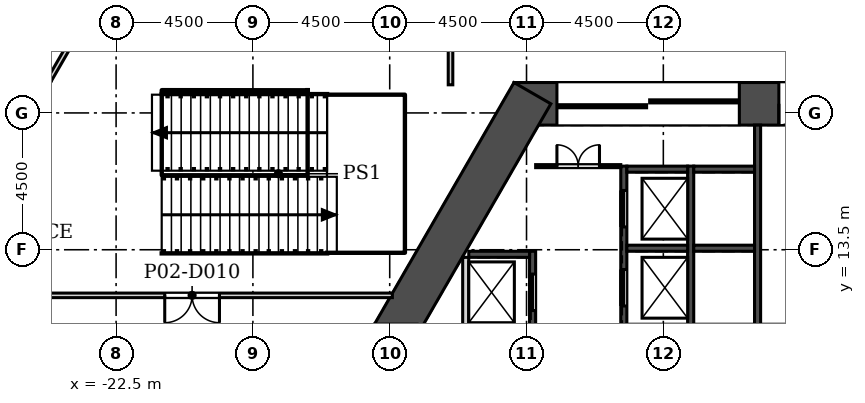
"""IFC4 building model, lengths in metres.
Left out: names, types, materials, properties, quantities, classifications, styles, units other than length and angle.
Written with IfcOpenShell. Run it as: python <this file> out.ifc"""

import sys

from ifc_helpers import new_model, si_unit, direction, frame, frame_2d, origin, place, context, subcontext, project, spatial, rectangle, extrude, element, fill, save


model = new_model("IFC4")
c1 = context("Model", 3, precision=1e-05, world=origin(), true_north=direction((0.0, 1.0)))
c2 = subcontext(c1, "Body", "Model", "MODEL_VIEW")
j1 = project(units=[si_unit("LENGTHUNIT", "METRE"), si_unit("PLANEANGLEUNIT", "RADIAN")], contexts=[c1])
p1 = place(None, origin())
s1 = spatial("IfcSite", under=j1, at=p1, CompositionType="ELEMENT")
p2 = place(p1, origin())
s2 = spatial("IfcBuilding", under=s1, at=p2, CompositionType="ELEMENT")
p3 = place(p2, frame((0.0, 0.0, 14.0)))
s3 = spatial("IfcBuildingStorey", under=s2, at=p3, CompositionType="ELEMENT", Elevation=14.0)
p4 = place(p3, frame((9.412, 18.3, 0.0), z_axis=(0.0, 0.0, 1.0), x_axis=(-1.0, 0.0, 0.0)))
e1 = element("IfcWall", 1, at=p4, inside=s3, PredefinedType="SHEAR", context=c2, shape_type="SweptSolid", body=[
    extrude(rectangle(XDim=18.823, YDim=1.4, at=frame_2d((9.412, 0.0))), origin(), (0.0, 0.0, 1.0), 6.0),
])
p5 = place(p4, frame((8.711, 0.0, 0.0)))
e2 = element("IfcOpeningElement", 2, at=p5, cuts=e1, PredefinedType="OPENING", context=c2, shape_type="SweptSolid", body=[
    extrude(rectangle(XDim=1.4, YDim=2.1, at=frame_2d((0.7, 1.05))), frame((0.0, 0.71, 0.0), z_axis=(0.0, -1.0, 0.0), x_axis=(1.0, 0.0, 0.0)), (0.0, 0.0, 1.0), 1.42),
])
p6 = place(p4, frame((11.412, 0.0, 0.0)))
e3 = element("IfcOpeningElement", 3, at=p6, cuts=e1, PredefinedType="OPENING", context=c2, shape_type="SweptSolid", body=[
    extrude(rectangle(XDim=6.0, YDim=2.4, at=frame_2d((3.0, 1.2))), frame((0.0, 0.71, 0.0), z_axis=(0.0, -1.0, 0.0), x_axis=(1.0, 0.0, 0.0)), (0.0, 0.0, 1.0), 1.42),
])
p7 = place(p4, frame((1.412, 0.0, 0.0)))
e4 = element("IfcOpeningElement", 4, at=p7, cuts=e1, PredefinedType="OPENING", context=c2, shape_type="SweptSolid", body=[
    extrude(rectangle(XDim=6.0, YDim=2.4, at=frame_2d((3.0, 1.2))), frame((0.0, 0.71, 0.0), z_axis=(0.0, -1.0, 0.0), x_axis=(1.0, 0.0, 0.0)), (0.0, 0.0, 1.0), 1.42),
])
p8 = place(p3, frame((-8.805, 18.65, 0.0), z_axis=(0.0, 0.0, 1.0), x_axis=(-0.50000187635, -0.866024320471, 0.0)))
e5 = element("IfcWall", 5, at=p8, inside=s3, PredefinedType="SHEAR", context=c2, shape_type="SweptSolid", body=[
    extrude(rectangle(XDim=9.177, YDim=1.4, at=frame_2d((4.588, 0.0))), origin(), (0.0, 0.0, 1.0), 6.0),
])
p9 = place(p3, frame((-4.853, 74.393, 0.0), z_axis=(0.0, 0.0, 1.0), x_axis=(-0.49999894854, -0.866026010844, 0.0)))
e6 = element("IfcWall", 6, at=p9, inside=s3, PredefinedType="SOLIDWALL", context=c2, shape_type="SweptSolid", body=[
    extrude(rectangle(XDim=76.0, YDim=0.34, at=frame_2d((38.0, 0.0))), origin(), (0.0, 0.0, 1.0), 5.7),
])
p10 = place(p9, frame((1.058, 0.0, 0.9)))
e7 = element("IfcOpeningElement", 7, at=p10, cuts=e6, PredefinedType="OPENING", context=c2, shape_type="SweptSolid", body=[
    extrude(rectangle(XDim=1.885, YDim=3.5, at=frame_2d((0.942, 1.75))), frame((0.0, 0.18, 0.0), z_axis=(0.0, -1.0, 0.0), x_axis=(1.0, 0.0, 0.0)), (0.0, 0.0, 1.0), 0.36),
])
p11 = place(p9, frame((4.058, 0.0, 0.9)))
e8 = element("IfcOpeningElement", 8, at=p11, cuts=e6, PredefinedType="OPENING", context=c2, shape_type="SweptSolid", body=[
    extrude(rectangle(XDim=1.885, YDim=3.5, at=frame_2d((0.942, 1.75))), frame((0.0, 0.18, 0.0), z_axis=(0.0, -1.0, 0.0), x_axis=(1.0, 0.0, 0.0)), (0.0, 0.0, 1.0), 0.36),
])
p12 = place(p9, frame((7.058, 0.0, 0.9)))
e9 = element("IfcOpeningElement", 9, at=p12, cuts=e6, PredefinedType="OPENING", context=c2, shape_type="SweptSolid", body=[
    extrude(rectangle(XDim=1.885, YDim=3.5, at=frame_2d((0.942, 1.75))), frame((0.0, 0.18, 0.0), z_axis=(0.0, -1.0, 0.0), x_axis=(1.0, 0.0, 0.0)), (0.0, 0.0, 1.0), 0.36),
])
p13 = place(p9, frame((10.058, 0.0, 0.9)))
e10 = element("IfcOpeningElement", 10, at=p13, cuts=e6, PredefinedType="OPENING", context=c2, shape_type="SweptSolid", body=[
    extrude(rectangle(XDim=1.885, YDim=3.5, at=frame_2d((0.942, 1.75))), frame((0.0, 0.18, 0.0), z_axis=(0.0, -1.0, 0.0), x_axis=(1.0, 0.0, 0.0)), (0.0, 0.0, 1.0), 0.36),
])
p14 = place(p9, frame((13.058, 0.0, 0.9)))
e11 = element("IfcOpeningElement", 11, at=p14, cuts=e6, PredefinedType="OPENING", context=c2, shape_type="SweptSolid", body=[
    extrude(rectangle(XDim=1.885, YDim=3.5, at=frame_2d((0.942, 1.75))), frame((0.0, 0.18, 0.0), z_axis=(0.0, -1.0, 0.0), x_axis=(1.0, 0.0, 0.0)), (0.0, 0.0, 1.0), 0.36),
])
p15 = place(p9, frame((16.058, 0.0, 0.9)))
e12 = element("IfcOpeningElement", 12, at=p15, cuts=e6, PredefinedType="OPENING", context=c2, shape_type="SweptSolid", body=[
    extrude(rectangle(XDim=1.885, YDim=3.5, at=frame_2d((0.942, 1.75))), frame((0.0, 0.18, 0.0), z_axis=(0.0, -1.0, 0.0), x_axis=(1.0, 0.0, 0.0)), (0.0, 0.0, 1.0), 0.36),
])
p16 = place(p9, frame((19.058, 0.0, 0.9)))
e13 = element("IfcOpeningElement", 13, at=p16, cuts=e6, PredefinedType="OPENING", context=c2, shape_type="SweptSolid", body=[
    extrude(rectangle(XDim=1.885, YDim=3.5, at=frame_2d((0.942, 1.75))), frame((0.0, 0.18, 0.0), z_axis=(0.0, -1.0, 0.0), x_axis=(1.0, 0.0, 0.0)), (0.0, 0.0, 1.0), 0.36),
])
p17 = place(p9, frame((22.058, 0.0, 0.9)))
e14 = element("IfcOpeningElement", 14, at=p17, cuts=e6, PredefinedType="OPENING", context=c2, shape_type="SweptSolid", body=[
    extrude(rectangle(XDim=1.885, YDim=3.5, at=frame_2d((0.942, 1.75))), frame((0.0, 0.18, 0.0), z_axis=(0.0, -1.0, 0.0), x_axis=(1.0, 0.0, 0.0)), (0.0, 0.0, 1.0), 0.36),
])
p18 = place(p9, frame((25.058, 0.0, 0.9)))
e15 = element("IfcOpeningElement", 15, at=p18, cuts=e6, PredefinedType="OPENING", context=c2, shape_type="SweptSolid", body=[
    extrude(rectangle(XDim=1.885, YDim=3.5, at=frame_2d((0.942, 1.75))), frame((0.0, 0.18, 0.0), z_axis=(0.0, -1.0, 0.0), x_axis=(1.0, 0.0, 0.0)), (0.0, 0.0, 1.0), 0.36),
])
p19 = place(p9, frame((28.058, 0.0, 0.9)))
e16 = element("IfcOpeningElement", 16, at=p19, cuts=e6, PredefinedType="OPENING", context=c2, shape_type="SweptSolid", body=[
    extrude(rectangle(XDim=1.885, YDim=3.5, at=frame_2d((0.942, 1.75))), frame((0.0, 0.18, 0.0), z_axis=(0.0, -1.0, 0.0), x_axis=(1.0, 0.0, 0.0)), (0.0, 0.0, 1.0), 0.36),
])
p20 = place(p9, frame((31.058, 0.0, 0.9)))
e17 = element("IfcOpeningElement", 17, at=p20, cuts=e6, PredefinedType="OPENING", context=c2, shape_type="SweptSolid", body=[
    extrude(rectangle(XDim=1.885, YDim=3.5, at=frame_2d((0.942, 1.75))), frame((0.0, 0.18, 0.0), z_axis=(0.0, -1.0, 0.0), x_axis=(1.0, 0.0, 0.0)), (0.0, 0.0, 1.0), 0.36),
])
p21 = place(p9, frame((34.058, 0.0, 0.9)))
e18 = element("IfcOpeningElement", 18, at=p21, cuts=e6, PredefinedType="OPENING", context=c2, shape_type="SweptSolid", body=[
    extrude(rectangle(XDim=1.885, YDim=3.5, at=frame_2d((0.942, 1.75))), frame((0.0, 0.18, 0.0), z_axis=(0.0, -1.0, 0.0), x_axis=(1.0, 0.0, 0.0)), (0.0, 0.0, 1.0), 0.36),
])
p22 = place(p9, frame((37.058, 0.0, 0.9)))
e19 = element("IfcOpeningElement", 19, at=p22, cuts=e6, PredefinedType="OPENING", context=c2, shape_type="SweptSolid", body=[
    extrude(rectangle(XDim=1.885, YDim=3.5, at=frame_2d((0.942, 1.75))), frame((0.0, 0.18, 0.0), z_axis=(0.0, -1.0, 0.0), x_axis=(1.0, 0.0, 0.0)), (0.0, 0.0, 1.0), 0.36),
])
p23 = place(p9, frame((40.058, 0.0, 0.9)))
e20 = element("IfcOpeningElement", 20, at=p23, cuts=e6, PredefinedType="OPENING", context=c2, shape_type="SweptSolid", body=[
    extrude(rectangle(XDim=1.885, YDim=3.5, at=frame_2d((0.942, 1.75))), frame((0.0, 0.18, 0.0), z_axis=(0.0, -1.0, 0.0), x_axis=(1.0, 0.0, 0.0)), (0.0, 0.0, 1.0), 0.36),
])
p24 = place(p9, frame((43.058, 0.0, 0.9)))
e21 = element("IfcOpeningElement", 21, at=p24, cuts=e6, PredefinedType="OPENING", context=c2, shape_type="SweptSolid", body=[
    extrude(rectangle(XDim=1.885, YDim=3.5, at=frame_2d((0.942, 1.75))), frame((0.0, 0.18, 0.0), z_axis=(0.0, -1.0, 0.0), x_axis=(1.0, 0.0, 0.0)), (0.0, 0.0, 1.0), 0.36),
])
p25 = place(p9, frame((46.058, 0.0, 0.9)))
e22 = element("IfcOpeningElement", 22, at=p25, cuts=e6, PredefinedType="OPENING", context=c2, shape_type="SweptSolid", body=[
    extrude(rectangle(XDim=1.885, YDim=3.5, at=frame_2d((0.942, 1.75))), frame((0.0, 0.18, 0.0), z_axis=(0.0, -1.0, 0.0), x_axis=(1.0, 0.0, 0.0)), (0.0, 0.0, 1.0), 0.36),
])
p26 = place(p9, frame((49.058, 0.0, 0.9)))
e23 = element("IfcOpeningElement", 23, at=p26, cuts=e6, PredefinedType="OPENING", context=c2, shape_type="SweptSolid", body=[
    extrude(rectangle(XDim=1.885, YDim=3.5, at=frame_2d((0.942, 1.75))), frame((0.0, 0.18, 0.0), z_axis=(0.0, -1.0, 0.0), x_axis=(1.0, 0.0, 0.0)), (0.0, 0.0, 1.0), 0.36),
])
p27 = place(p9, frame((52.058, 0.0, 0.9)))
e24 = element("IfcOpeningElement", 24, at=p27, cuts=e6, PredefinedType="OPENING", context=c2, shape_type="SweptSolid", body=[
    extrude(rectangle(XDim=1.885, YDim=3.5, at=frame_2d((0.942, 1.75))), frame((0.0, 0.18, 0.0), z_axis=(0.0, -1.0, 0.0), x_axis=(1.0, 0.0, 0.0)), (0.0, 0.0, 1.0), 0.36),
])
p28 = place(p9, frame((55.058, 0.0, 0.9)))
e25 = element("IfcOpeningElement", 25, at=p28, cuts=e6, PredefinedType="OPENING", context=c2, shape_type="SweptSolid", body=[
    extrude(rectangle(XDim=1.885, YDim=3.5, at=frame_2d((0.942, 1.75))), frame((0.0, 0.18, 0.0), z_axis=(0.0, -1.0, 0.0), x_axis=(1.0, 0.0, 0.0)), (0.0, 0.0, 1.0), 0.36),
])
p29 = place(p9, frame((58.058, 0.0, 0.9)))
e26 = element("IfcOpeningElement", 26, at=p29, cuts=e6, PredefinedType="OPENING", context=c2, shape_type="SweptSolid", body=[
    extrude(rectangle(XDim=1.885, YDim=3.5, at=frame_2d((0.942, 1.75))), frame((0.0, 0.18, 0.0), z_axis=(0.0, -1.0, 0.0), x_axis=(1.0, 0.0, 0.0)), (0.0, 0.0, 1.0), 0.36),
])
p30 = place(p9, frame((61.058, 0.0, 0.9)))
e27 = element("IfcOpeningElement", 27, at=p30, cuts=e6, PredefinedType="OPENING", context=c2, shape_type="SweptSolid", body=[
    extrude(rectangle(XDim=1.885, YDim=3.5, at=frame_2d((0.942, 1.75))), frame((0.0, 0.18, 0.0), z_axis=(0.0, -1.0, 0.0), x_axis=(1.0, 0.0, 0.0)), (0.0, 0.0, 1.0), 0.36),
])
p31 = place(p9, frame((64.058, 0.0, 0.9)))
e28 = element("IfcOpeningElement", 28, at=p31, cuts=e6, PredefinedType="OPENING", context=c2, shape_type="SweptSolid", body=[
    extrude(rectangle(XDim=1.885, YDim=3.5, at=frame_2d((0.942, 1.75))), frame((0.0, 0.18, 0.0), z_axis=(0.0, -1.0, 0.0), x_axis=(1.0, 0.0, 0.0)), (0.0, 0.0, 1.0), 0.36),
])
p32 = place(p9, frame((67.058, 0.0, 0.9)))
e29 = element("IfcOpeningElement", 29, at=p32, cuts=e6, PredefinedType="OPENING", context=c2, shape_type="SweptSolid", body=[
    extrude(rectangle(XDim=1.885, YDim=3.5, at=frame_2d((0.942, 1.75))), frame((0.0, 0.18, 0.0), z_axis=(0.0, -1.0, 0.0), x_axis=(1.0, 0.0, 0.0)), (0.0, 0.0, 1.0), 0.36),
])
p33 = place(p9, frame((70.058, 0.0, 0.9)))
e30 = element("IfcOpeningElement", 30, at=p33, cuts=e6, PredefinedType="OPENING", context=c2, shape_type="SweptSolid", body=[
    extrude(rectangle(XDim=1.885, YDim=3.5, at=frame_2d((0.942, 1.75))), frame((0.0, 0.18, 0.0), z_axis=(0.0, -1.0, 0.0), x_axis=(1.0, 0.0, 0.0)), (0.0, 0.0, 1.0), 0.36),
])
p34 = place(p9, frame((73.058, 0.0, 0.9)))
e31 = element("IfcOpeningElement", 31, at=p34, cuts=e6, PredefinedType="OPENING", context=c2, shape_type="SweptSolid", body=[
    extrude(rectangle(XDim=1.885, YDim=3.5, at=frame_2d((0.942, 1.75))), frame((0.0, 0.18, 0.0), z_axis=(0.0, -1.0, 0.0), x_axis=(1.0, 0.0, 0.0)), (0.0, 0.0, 1.0), 0.36),
])
p35 = place(p3, frame((-11.0, 5.85, 0.0), z_axis=(0.0, 0.0, 1.0), x_axis=(0.0, 1.0, 0.0)))
e32 = element("IfcWall", 32, at=p35, inside=s3, PredefinedType="SOLIDWALL", context=c2, shape_type="SweptSolid", body=[
    extrude(rectangle(XDim=7.4, YDim=0.2, at=frame_2d((3.7, 0.0))), origin(), (0.0, 0.0, 1.0), 5.7),
])
p36 = place(p3, frame((-8.8, 8.25, -0.3), z_axis=(0.0, 0.0, 1.0), x_axis=(0.0, 1.0, 0.0)))
e33 = element("IfcWall", 33, at=p36, inside=s3, PredefinedType="SOLIDWALL", context=c2, shape_type="SweptSolid", body=[
    extrude(rectangle(XDim=5.2, YDim=0.2, at=frame_2d((2.6, 0.0))), origin(), (0.0, 0.0, 1.0), 6.0),
])
p37 = place(p36, frame((0.75, 0.0, 0.3)))
e34 = element("IfcOpeningElement", 34, at=p37, cuts=e33, PredefinedType="OPENING", context=c2, shape_type="SweptSolid", body=[
    extrude(rectangle(XDim=1.2, YDim=2.1, at=frame_2d((0.6, 1.05))), frame((0.0, 0.11, 0.0), z_axis=(0.0, -1.0, 0.0), x_axis=(1.0, 0.0, 0.0)), (0.0, 0.0, 1.0), 0.22),
])
p38 = place(p36, frame((3.25, 0.0, 0.3)))
e35 = element("IfcOpeningElement", 35, at=p38, cuts=e33, PredefinedType="OPENING", context=c2, shape_type="SweptSolid", body=[
    extrude(rectangle(XDim=1.2, YDim=2.1, at=frame_2d((0.6, 1.05))), frame((0.0, 0.11, 0.0), z_axis=(0.0, -1.0, 0.0), x_axis=(1.0, 0.0, 0.0)), (0.0, 0.0, 1.0), 0.22),
])
p39 = place(p3, frame((-5.8, 8.25, -0.3), z_axis=(0.0, 0.0, 1.0), x_axis=(0.0, 1.0, 0.0)))
e36 = element("IfcWall", 36, at=p39, inside=s3, PredefinedType="SOLIDWALL", context=c2, shape_type="SweptSolid", body=[
    extrude(rectangle(XDim=8.0, YDim=0.2, at=frame_2d((4.0, 0.0))), origin(), (0.0, 0.0, 1.0), 6.0),
])
p40 = place(p39, frame((0.8, 0.0, 0.3)))
e37 = element("IfcOpeningElement", 37, at=p40, cuts=e36, PredefinedType="OPENING", context=c2, shape_type="SweptSolid", body=[
    extrude(rectangle(XDim=1.2, YDim=2.1, at=frame_2d((0.6, 1.05))), frame((0.0, 0.11, 0.0), z_axis=(0.0, -1.0, 0.0), x_axis=(1.0, 0.0, 0.0)), (0.0, 0.0, 1.0), 0.22),
])
p41 = place(p39, frame((3.4, 0.0, 0.3)))
e38 = element("IfcOpeningElement", 38, at=p41, cuts=e36, PredefinedType="OPENING", context=c2, shape_type="SweptSolid", body=[
    extrude(rectangle(XDim=1.2, YDim=2.1, at=frame_2d((0.6, 1.05))), frame((0.0, 0.11, 0.0), z_axis=(0.0, -1.0, 0.0), x_axis=(1.0, 0.0, 0.0)), (0.0, 0.0, 1.0), 0.22),
])
p42 = place(p39, frame((6.0, 0.0, 0.3)))
e39 = element("IfcOpeningElement", 39, at=p42, cuts=e36, PredefinedType="OPENING", context=c2, shape_type="SweptSolid", body=[
    extrude(rectangle(XDim=1.2, YDim=2.1, at=frame_2d((0.6, 1.05))), frame((0.0, 0.11, 0.0), z_axis=(0.0, -1.0, 0.0), x_axis=(1.0, 0.0, 0.0)), (0.0, 0.0, 1.0), 0.22),
])
p43 = place(p3, frame((-3.6, 8.45, -0.3), z_axis=(0.0, 0.0, 1.0), x_axis=(0.0, 1.0, 0.0)))
e40 = element("IfcWall", 40, at=p43, inside=s3, PredefinedType="SOLIDWALL", context=c2, shape_type="SweptSolid", body=[
    extrude(rectangle(XDim=7.8, YDim=0.2, at=frame_2d((3.9, 0.0))), origin(), (0.0, 0.0, 1.0), 6.0),
])
p44 = place(p3, frame((-1.4, 5.85, -0.3), z_axis=(0.0, 0.0, 1.0), x_axis=(0.0, 1.0, 0.0)))
e41 = element("IfcWall", 41, at=p44, inside=s3, PredefinedType="SOLIDWALL", context=c2, shape_type="SweptSolid", body=[
    extrude(rectangle(XDim=11.75, YDim=0.2, at=frame_2d((5.875, 0.0))), origin(), (0.0, 0.0, 1.0), 6.0),
])
p45 = place(p44, frame((3.2, 0.0, 0.3)))
e42 = element("IfcOpeningElement", 42, at=p45, cuts=e41, PredefinedType="OPENING", context=c2, shape_type="SweptSolid", body=[
    extrude(rectangle(XDim=1.2, YDim=2.1, at=frame_2d((0.6, 1.05))), frame((0.0, 0.11, 0.0), z_axis=(0.0, -1.0, 0.0), x_axis=(1.0, 0.0, 0.0)), (0.0, 0.0, 1.0), 0.22),
])
p46 = place(p44, frame((0.65, 0.0, 0.3)))
e43 = element("IfcOpeningElement", 43, at=p46, cuts=e41, PredefinedType="OPENING", context=c2, shape_type="SweptSolid", body=[
    extrude(rectangle(XDim=1.1, YDim=2.1, at=frame_2d((0.55, 1.05))), frame((0.0, 0.11, 0.0), z_axis=(0.0, -1.0, 0.0), x_axis=(1.0, 0.0, 0.0)), (0.0, 0.0, 1.0), 0.22),
])
for number, where, z_axis, x_axis in (
    (44, (-10.9, 13.35, -0.3), (0.0, 0.0, 1.0), (1.0, 0.0, 0.0)),
    (45, (-5.7, 13.55, -0.3), (0.0, 0.0, 1.0), (1.0, 0.0, 0.0)),
    (46, (-5.7, 16.15, -0.3), (0.0, 0.0, 1.0), (1.0, 0.0, 0.0)),
    (47, (-3.5, 13.55, -0.3), (0.0, 0.0, 1.0), (1.0, 0.0, 0.0)),
    (48, (-3.5, 16.15, -0.3), (0.0, 0.0, 1.0), (1.0, 0.0, 0.0)),
):
    element("IfcWall", number, at=place(p3, frame(where, z_axis=z_axis, x_axis=x_axis)), inside=s3, PredefinedType="SOLIDWALL", context=c2, shape_type="SweptSolid", body=[
        extrude(rectangle(XDim=2.0, YDim=0.2, at=frame_2d((1.0, 0.0))), origin(), (0.0, 0.0, 1.0), 6.0),
    ])
p47 = place(p3, frame((-8.7, 16.25, 0.0), z_axis=(0.0, 0.0, 1.0), x_axis=(1.0, 0.0, 0.0)))
e49 = element("IfcWall", 49, at=p47, inside=s3, PredefinedType="PARTITIONING", context=c2, shape_type="SweptSolid", body=[
    extrude(rectangle(XDim=2.8, YDim=0.1, at=frame_2d((1.4, 0.0))), origin(), (0.0, 0.0, 1.0), 5.7),
])
p48 = place(p47, frame((0.7, 0.0, 0.0)))
e50 = element("IfcOpeningElement", 50, at=p48, cuts=e49, PredefinedType="OPENING", context=c2, shape_type="SweptSolid", body=[
    extrude(rectangle(XDim=1.4, YDim=2.1, at=frame_2d((0.7, 1.05))), frame((0.0, 0.06, 0.0), z_axis=(0.0, -1.0, 0.0), x_axis=(1.0, 0.0, 0.0)), (0.0, 0.0, 1.0), 0.12),
])
p49 = place(p3, frame((-25.925, 12.0, 0.0), z_axis=(0.0, 0.0, 1.0), x_axis=(1.0, 0.0, 0.0)))
e51 = element("IfcWall", 51, at=p49, inside=s3, PredefinedType="PARTITIONING", context=c2, shape_type="SweptSolid", body=[
    extrude(rectangle(XDim=12.512, YDim=0.15, at=frame_2d((6.256, 0.0))), origin(), (0.0, 0.0, 1.0), 5.7),
])
p50 = place(p49, frame((5.025, 0.0, 0.0)))
e52 = element("IfcOpeningElement", 52, at=p50, cuts=e51, PredefinedType="OPENING", context=c2, shape_type="SweptSolid", body=[
    extrude(rectangle(XDim=1.8, YDim=2.1, at=frame_2d((0.9, 1.05))), frame((0.0, 0.085, 0.0), z_axis=(0.0, -1.0, 0.0), x_axis=(1.0, 0.0, 0.0)), (0.0, 0.0, 1.0), 0.17),
])
p51 = place(p3, frame((-23.841, 20.565, 0.0), z_axis=(0.0, 0.0, 1.0), x_axis=(-0.500019299785, -0.866014260761, 0.0)))
e53 = element("IfcWall", 53, at=p51, inside=s3, PredefinedType="PARTITIONING", context=c2, shape_type="SweptSolid", body=[
    extrude(rectangle(XDim=1.732, YDim=0.15, at=frame_2d((0.866, 0.0))), origin(), (0.0, 0.0, 1.0), 5.7),
])
p52 = place(p3, frame((-11.5, 28.835, 0.0), z_axis=(0.0, 0.0, 1.0), x_axis=(0.0, -1.0, 0.0)))
e54 = element("IfcWall", 54, at=p52, inside=s3, PredefinedType="PARTITIONING", context=c2, shape_type="SweptSolid", body=[
    extrude(rectangle(XDim=9.91, YDim=0.15, at=frame_2d((4.955, 0.0))), origin(), (0.0, 0.0, 1.0), 5.7),
])
p53 = place(p52, frame((1.335, 0.0, 0.0)))
e55 = element("IfcOpeningElement", 55, at=p53, cuts=e54, PredefinedType="OPENING", context=c2, shape_type="SweptSolid", body=[
    extrude(rectangle(XDim=3.0, YDim=2.4, at=frame_2d((1.5, 1.2))), frame((0.0, 0.085, 0.0), z_axis=(0.0, -1.0, 0.0), x_axis=(1.0, 0.0, 0.0)), (0.0, 0.0, 1.0), 0.17),
])
p54 = place(p3, frame((-13.125, 13.45, 0.0), z_axis=(0.0, 0.0, 1.0), x_axis=(0.0, 1.0, 0.0)))
e56 = element("IfcWall", 56, at=p54, inside=s3, PredefinedType="SOLIDWALL", context=c2, shape_type="SweptSolid", body=[
    extrude(rectangle(XDim=5.1, YDim=0.25, at=frame_2d((2.55, 0.0))), origin(), (0.0, 0.0, 1.0), 2.8),
])
for number, where, z_axis, x_axis in (
    (57, (-13.125, 13.525, 0.0), (0.0, 0.0, 1.0), (-1.0, 0.0, 0.0)),
    (58, (-13.125, 18.475, 0.0), (0.0, 0.0, 1.0), (-1.0, 0.0, 0.0)),
):
    element("IfcWall", number, at=place(p3, frame(where, z_axis=z_axis, x_axis=x_axis)), inside=s3, PredefinedType="SOLIDWALL", context=c2, shape_type="SweptSolid", body=[
        extrude(rectangle(XDim=2.31, YDim=0.25, at=frame_2d((1.155, 0.0))), origin(), (0.0, 0.0, 1.0), 2.8),
    ])
p55 = place(p38, origin())
e59 = element("IfcDoor", 59, at=p55, inside=s3, OperationType="SLIDING_TO_LEFT", PredefinedType="DOOR", context=c2, shape_type="SweptSolid", body=[
    extrude(rectangle(XDim=1.2, YDim=2.1, at=frame_2d((0.6, 1.05))), frame((0.0, 0.025, 0.0), z_axis=(0.0, -1.0, 0.0), x_axis=(1.0, 0.0, 0.0)), (0.0, 0.0, 1.0), 0.05),
])
fill(e35, e59)
p56 = place(p41, origin())
e60 = element("IfcDoor", 60, at=p56, inside=s3, OperationType="SLIDING_TO_LEFT", PredefinedType="DOOR", context=c2, shape_type="SweptSolid", body=[
    extrude(rectangle(XDim=1.2, YDim=2.1, at=frame_2d((0.6, 1.05))), frame((0.0, 0.025, 0.0), z_axis=(0.0, -1.0, 0.0), x_axis=(1.0, 0.0, 0.0)), (0.0, 0.0, 1.0), 0.05),
])
fill(e38, e60)
p57 = place(p42, origin())
e61 = element("IfcDoor", 61, at=p57, inside=s3, OperationType="SLIDING_TO_LEFT", PredefinedType="DOOR", context=c2, shape_type="SweptSolid", body=[
    extrude(rectangle(XDim=1.2, YDim=2.1, at=frame_2d((0.6, 1.05))), frame((0.0, 0.025, 0.0), z_axis=(0.0, -1.0, 0.0), x_axis=(1.0, 0.0, 0.0)), (0.0, 0.0, 1.0), 0.05),
])
fill(e39, e61)
p58 = place(p48, origin())
e62 = element("IfcDoor", 62, at=p58, inside=s3, OperationType="DOUBLE_DOOR_SINGLE_SWING", PredefinedType="DOOR", context=c2, shape_type="SweptSolid", body=[
    extrude(rectangle(XDim=1.4, YDim=2.1, at=frame_2d((0.7, 1.05))), frame((0.0, 0.025, 0.0), z_axis=(0.0, -1.0, 0.0), x_axis=(1.0, 0.0, 0.0)), (0.0, 0.0, 1.0), 0.05),
])
fill(e50, e62)
p59 = place(p5, origin())
e63 = element("IfcDoor", 63, at=p59, inside=s3, OperationType="DOUBLE_DOOR_SINGLE_SWING", PredefinedType="DOOR", context=c2, shape_type="SweptSolid", body=[
    extrude(rectangle(XDim=1.4, YDim=2.1, at=frame_2d((0.7, 1.05))), frame((0.0, 0.025, 0.0), z_axis=(0.0, -1.0, 0.0), x_axis=(1.0, 0.0, 0.0)), (0.0, 0.0, 1.0), 0.05),
])
fill(e2, e63)
p60 = place(p6, origin())
e64 = element("IfcDoor", 64, at=p60, inside=s3, OperationType="DOUBLE_DOOR_SLIDING", PredefinedType="DOOR", context=c2, shape_type="SweptSolid", body=[
    extrude(rectangle(XDim=6.0, YDim=2.4, at=frame_2d((3.0, 1.2))), frame((0.0, 0.025, 0.0), z_axis=(0.0, -1.0, 0.0), x_axis=(1.0, 0.0, 0.0)), (0.0, 0.0, 1.0), 0.05),
])
fill(e3, e64)
p61 = place(p50, frame((1.8, 0.0, 0.0), z_axis=(0.0, 0.0, 1.0), x_axis=(-1.0, 0.0, 0.0)))
e65 = element("IfcDoor", 65, at=p61, inside=s3, OperationType="DOUBLE_DOOR_SINGLE_SWING", PredefinedType="DOOR", context=c2, shape_type="SweptSolid", body=[
    extrude(rectangle(XDim=1.8, YDim=2.1, at=frame_2d((0.9, 1.05))), frame((0.0, 0.025, 0.0), z_axis=(0.0, -1.0, 0.0), x_axis=(1.0, 0.0, 0.0)), (0.0, 0.0, 1.0), 0.05),
])
fill(e52, e65)
save(model, sys.argv[1])
